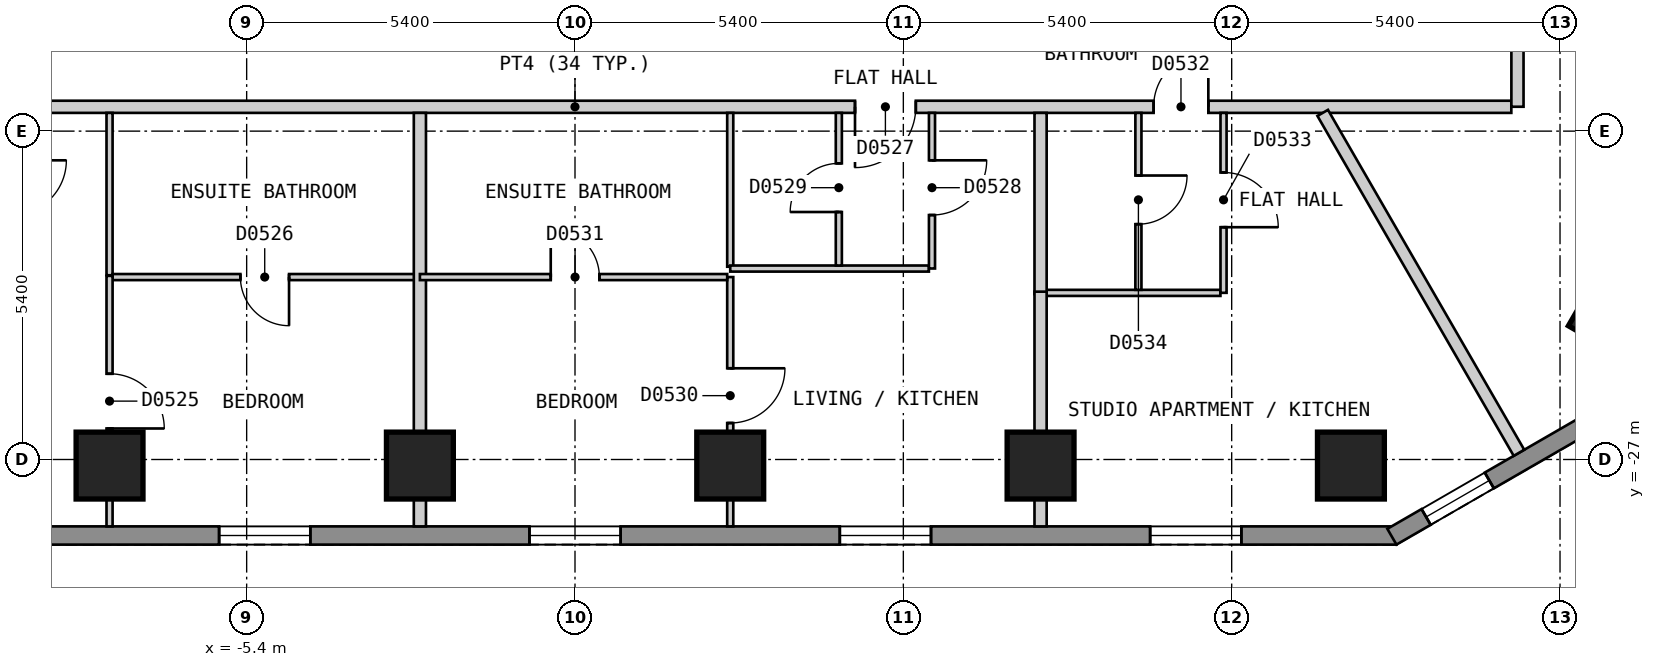
"""IFC4 building model, lengths in metres.
Left out: names, types, materials, properties, quantities, classifications, styles, units other than length and angle.
Written with IfcOpenShell. Run it as: python <this file> out.ifc"""

import sys

from ifc_helpers import new_model, si_unit, direction, frame, frame_2d, origin, origin_2d, place, context, subcontext, project, spatial, polyline, rectangle, outline, extrude, element, fill, save


model = new_model("IFC4")
c1 = context("Model", 3, precision=1e-05, world=origin(), true_north=direction((0.0, 1.0)))
c2 = subcontext(c1, "Body", "Model", "MODEL_VIEW")
j1 = project(units=[si_unit("LENGTHUNIT", "METRE"), si_unit("PLANEANGLEUNIT", "RADIAN")], contexts=[c1])
p1 = place(None, origin())
s1 = spatial("IfcSite", under=j1, at=p1, CompositionType="ELEMENT")
p2 = place(p1, origin())
s2 = spatial("IfcBuilding", under=s1, at=p2, CompositionType="ELEMENT")
p3 = place(p2, frame((0.0, 0.0, 56.4)))
s3 = spatial("IfcBuildingStorey", under=s2, at=p3, CompositionType="ELEMENT", Elevation=56.4)
for number, where, z_axis, x_axis in (
    (1, (-7.655, -27.1, 0.0), (0.0, 0.0, 1.0), (1.0, 0.0, 0.0)),
    (2, (-2.551, -27.1, 0.0), (0.0, 0.0, 1.0), (1.0, 0.0, 0.0)),
    (3, (2.553, -27.1, 0.0), (0.0, 0.0, 1.0), (1.0, 0.0, 0.0)),
    (4, (7.657, -27.1, 0.0), (0.0, 0.0, 1.0), (1.0, 0.0, 0.0)),
    (5, (12.761, -27.1, 0.0), (0.0, 0.0, 1.0), (1.0, 0.0, 0.0)),
    (6, (17.09, -24.6, 0.0), (0.0, 0.0, 1.0), (0.5, 0.866, 0.0)),
):
    element("IfcColumn", number, at=place(p3, frame(where, z_axis=z_axis, x_axis=x_axis)), inside=s3, PredefinedType="COLUMN", context=c2, shape_type="SweptSolid", body=[
        extrude(rectangle(XDim=1.1, YDim=1.1, at=origin_2d()), origin(), (0.0, 0.0, 1.0), 3.0),
    ])
p4 = place(p3, frame((-13.51, -28.25, 0.0), z_axis=(0.0, 0.0, 1.0), x_axis=(1.0, 0.0, 0.0)))
e7 = element("IfcWall", 7, at=p4, inside=s3, PredefinedType="SOLIDWALL", context=c2, shape_type="SweptSolid", body=[
    extrude(outline(polyline([(0.0, -0.15), (27.02, -0.15), (26.94, 0.15), (0.08, 0.15), (0.0, -0.15)])), origin(), (0.0, 0.0, 1.0), 2.7),
])
p5 = place(p4, frame((2.553, 0.0, 0.15)))
e8 = element("IfcOpeningElement", 8, at=p5, cuts=e7, PredefinedType="OPENING", context=c2, shape_type="SweptSolid", body=[
    extrude(rectangle(XDim=1.5, YDim=2.1, at=frame_2d((0.75, 1.05))), frame((0.0, 0.16, 0.0), z_axis=(0.0, -1.0, 0.0), x_axis=(1.0, 0.0, 0.0)), (0.0, 0.0, 1.0), 0.32),
])
p6 = place(p4, frame((7.657, 0.0, 0.15)))
e9 = element("IfcOpeningElement", 9, at=p6, cuts=e7, PredefinedType="OPENING", context=c2, shape_type="SweptSolid", body=[
    extrude(rectangle(XDim=1.5, YDim=2.1, at=frame_2d((0.75, 1.05))), frame((0.0, 0.16, 0.0), z_axis=(0.0, -1.0, 0.0), x_axis=(1.0, 0.0, 0.0)), (0.0, 0.0, 1.0), 0.32),
])
p7 = place(p4, frame((12.761, 0.0, 0.15)))
e10 = element("IfcOpeningElement", 10, at=p7, cuts=e7, PredefinedType="OPENING", context=c2, shape_type="SweptSolid", body=[
    extrude(rectangle(XDim=1.5, YDim=2.1, at=frame_2d((0.75, 1.05))), frame((0.0, 0.16, 0.0), z_axis=(0.0, -1.0, 0.0), x_axis=(1.0, 0.0, 0.0)), (0.0, 0.0, 1.0), 0.32),
])
p8 = place(p4, frame((17.865, 0.0, 0.15)))
e11 = element("IfcOpeningElement", 11, at=p8, cuts=e7, PredefinedType="OPENING", context=c2, shape_type="SweptSolid", body=[
    extrude(rectangle(XDim=1.5, YDim=2.1, at=frame_2d((0.75, 1.05))), frame((0.0, 0.16, 0.0), z_axis=(0.0, -1.0, 0.0), x_axis=(1.0, 0.0, 0.0)), (0.0, 0.0, 1.0), 0.32),
])
p9 = place(p4, frame((22.969, 0.0, 0.15)))
e12 = element("IfcOpeningElement", 12, at=p9, cuts=e7, PredefinedType="OPENING", context=c2, shape_type="SweptSolid", body=[
    extrude(rectangle(XDim=1.5, YDim=2.1, at=frame_2d((0.75, 1.05))), frame((0.0, 0.16, 0.0), z_axis=(0.0, -1.0, 0.0), x_axis=(1.0, 0.0, 0.0)), (0.0, 0.0, 1.0), 0.32),
])
p10 = place(p3, frame((13.435, -28.27, 0.0), z_axis=(0.0, 0.0, 1.0), x_axis=(0.866010750942, 0.50002537861, 0.0)))
e13 = element("IfcWall", 13, at=p10, inside=s3, PredefinedType="SOLIDWALL", context=c2, shape_type="SweptSolid", body=[
    extrude(outline(polyline([(0.0, -0.15), (5.0, -0.15), (4.919, 0.15), (0.08, 0.15), (0.0, -0.15)])), origin(), (0.0, 0.0, 1.0), 2.7),
])
p11 = place(p10, frame((0.65, 0.0, 0.15)))
e14 = element("IfcOpeningElement", 14, at=p11, cuts=e13, PredefinedType="OPENING", context=c2, shape_type="SweptSolid", body=[
    extrude(rectangle(XDim=1.2, YDim=2.1, at=frame_2d((0.6, 1.05))), frame((0.0, 0.16, 0.0), z_axis=(0.0, -1.0, 0.0), x_axis=(1.0, 0.0, 0.0)), (0.0, 0.0, 1.0), 0.32),
])
p12 = place(p3, frame((-15.4, -21.2, 0.0), z_axis=(0.0, 0.0, 1.0), x_axis=(1.0, 0.0, 0.0)))
e15 = element("IfcWall", 15, at=p12, inside=s3, PredefinedType="PARTITIONING", context=c2, shape_type="SweptSolid", body=[
    extrude(rectangle(XDim=30.799, YDim=0.2, at=frame_2d((15.399, 0.0))), origin(), (0.0, 0.0, 1.0), 2.7),
])
p13 = place(p12, frame((4.985, 0.0, 0.0)))
e16 = element("IfcOpeningElement", 16, at=p13, cuts=e15, PredefinedType="OPENING", context=c2, shape_type="SweptSolid", body=[
    extrude(rectangle(XDim=0.9, YDim=2.1, at=frame_2d((0.45, 1.05))), frame((0.0, 0.11, 0.0), z_axis=(0.0, -1.0, 0.0), x_axis=(1.0, 0.0, 0.0)), (0.0, 0.0, 1.0), 0.22),
])
p14 = place(p12, frame((20.005, 0.0, 0.0)))
e17 = element("IfcOpeningElement", 17, at=p14, cuts=e15, PredefinedType="OPENING", context=c2, shape_type="SweptSolid", body=[
    extrude(rectangle(XDim=1.0, YDim=2.1, at=frame_2d((0.5, 1.05))), frame((0.0, 0.11, 0.0), z_axis=(0.0, -1.0, 0.0), x_axis=(1.0, 0.0, 0.0)), (0.0, 0.0, 1.0), 0.22),
])
p15 = place(p12, frame((24.916, 0.0, 0.0)))
e18 = element("IfcOpeningElement", 18, at=p15, cuts=e15, PredefinedType="OPENING", context=c2, shape_type="SweptSolid", body=[
    extrude(rectangle(XDim=0.9, YDim=2.1, at=frame_2d((0.45, 1.05))), frame((0.0, 0.11, 0.0), z_axis=(0.0, -1.0, 0.0), x_axis=(1.0, 0.0, 0.0)), (0.0, 0.0, 1.0), 0.22),
])
p16 = place(p3, frame((15.5, -21.199, 0.0), z_axis=(0.0, 0.0, 1.0), x_axis=(0.0, 1.0, 0.0)))
e19 = element("IfcWall", 19, at=p16, inside=s3, PredefinedType="PARTITIONING", context=c2, shape_type="SweptSolid", body=[
    extrude(rectangle(XDim=7.575, YDim=0.2, at=frame_2d((3.788, 0.0))), origin(), (0.0, 0.0, 1.0), 2.7),
])
p17 = place(p16, frame((1.288, 0.0, 0.0)))
e20 = element("IfcOpeningElement", 20, at=p17, cuts=e19, PredefinedType="OPENING", context=c2, shape_type="SweptSolid", body=[
    extrude(rectangle(XDim=0.8, YDim=2.1, at=frame_2d((0.4, 1.05))), frame((0.0, 0.11, 0.0), z_axis=(0.0, -1.0, 0.0), x_axis=(1.0, 0.0, 0.0)), (0.0, 0.0, 1.0), 0.22),
])
p18 = place(p3, frame((-7.655, -21.3, 0.0), z_axis=(0.0, 0.0, 1.0), x_axis=(0.0, -1.0, 0.0)))
e21 = element("IfcWall", 21, at=p18, inside=s3, PredefinedType="PARTITIONING", context=c2, shape_type="SweptSolid", body=[
    extrude(rectangle(XDim=2.67, YDim=0.1, at=frame_2d((1.335, 0.0))), origin(), (0.0, 0.0, 1.0), 2.7),
])
p19 = place(p3, frame((2.553, -21.3, 0.0), z_axis=(0.0, 0.0, 1.0), x_axis=(0.0, -1.0, 0.0)))
e22 = element("IfcWall", 22, at=p19, inside=s3, PredefinedType="PARTITIONING", context=c2, shape_type="SweptSolid", body=[
    extrude(rectangle(XDim=2.53, YDim=0.1, at=frame_2d((1.265, 0.0))), origin(), (0.0, 0.0, 1.0), 2.7),
])
p20 = place(p3, frame((2.553, -23.86, 0.0), z_axis=(0.0, 0.0, 1.0), x_axis=(1.0, 0.0, 0.0)))
e23 = element("IfcWall", 23, at=p20, inside=s3, PredefinedType="PARTITIONING", context=c2, shape_type="SweptSolid", body=[
    extrude(rectangle(XDim=3.267, YDim=0.1, at=frame_2d((1.634, 0.0))), origin(), (0.0, 0.0, 1.0), 2.7),
])
p21 = place(p3, frame((-7.605, -24.0, 0.0), z_axis=(0.0, 0.0, 1.0), x_axis=(1.0, 0.0, 0.0)))
e24 = element("IfcWall", 24, at=p21, inside=s3, PredefinedType="PARTITIONING", context=c2, shape_type="SweptSolid", body=[
    extrude(rectangle(XDim=5.054, YDim=0.1, at=frame_2d((2.527, 0.0))), origin(), (0.0, 0.0, 1.0), 2.7),
])
p22 = place(p21, frame((2.102, 0.0, 0.0)))
e25 = element("IfcOpeningElement", 25, at=p22, cuts=e24, PredefinedType="OPENING", context=c2, shape_type="SweptSolid", body=[
    extrude(rectangle(XDim=0.8, YDim=2.1, at=frame_2d((0.4, 1.05))), frame((0.0, 0.06, 0.0), z_axis=(0.0, -1.0, 0.0), x_axis=(1.0, 0.0, 0.0)), (0.0, 0.0, 1.0), 0.12),
])
p23 = place(p3, frame((7.757, -24.26, 0.0), z_axis=(0.0, 0.0, 1.0), x_axis=(1.0, 0.0, 0.0)))
e26 = element("IfcWall", 26, at=p23, inside=s3, PredefinedType="PARTITIONING", context=c2, shape_type="SweptSolid", body=[
    extrude(rectangle(XDim=2.858, YDim=0.1, at=frame_2d((1.429, 0.0))), origin(), (0.0, 0.0, 1.0), 2.7),
])
p24 = place(p3, frame((4.339, -23.81, 0.0), z_axis=(0.0, 0.0, 1.0), x_axis=(0.0, 1.0, 0.0)))
e27 = element("IfcWall", 27, at=p24, inside=s3, PredefinedType="PARTITIONING", context=c2, shape_type="SweptSolid", body=[
    extrude(rectangle(XDim=2.51, YDim=0.1, at=frame_2d((1.255, 0.0))), origin(), (0.0, 0.0, 1.0), 2.7),
])
p25 = place(p24, frame((0.88, 0.0, 0.0)))
e28 = element("IfcOpeningElement", 28, at=p25, cuts=e27, PredefinedType="OPENING", context=c2, shape_type="SweptSolid", body=[
    extrude(rectangle(XDim=0.8, YDim=2.1, at=frame_2d((0.4, 1.05))), frame((0.0, 0.06, 0.0), z_axis=(0.0, -1.0, 0.0), x_axis=(1.0, 0.0, 0.0)), (0.0, 0.0, 1.0), 0.12),
])
p26 = place(p3, frame((5.871, -23.859, 0.0), z_axis=(0.0, 0.0, 1.0), x_axis=(0.0, 1.0, 0.0)))
e29 = element("IfcWall", 29, at=p26, inside=s3, PredefinedType="PARTITIONING", context=c2, shape_type="SweptSolid", body=[
    extrude(rectangle(XDim=2.559, YDim=0.1, at=frame_2d((1.279, 0.0))), origin(), (0.0, 0.0, 1.0), 2.7),
])
p27 = place(p26, frame((0.879, 0.0, 0.0)))
e30 = element("IfcOpeningElement", 30, at=p27, cuts=e29, PredefinedType="OPENING", context=c2, shape_type="SweptSolid", body=[
    extrude(rectangle(XDim=0.9, YDim=2.1, at=frame_2d((0.45, 1.05))), frame((0.0, 0.06, 0.0), z_axis=(0.0, -1.0, 0.0), x_axis=(1.0, 0.0, 0.0)), (0.0, 0.0, 1.0), 0.12),
])
p28 = place(p3, frame((9.266, -24.21, 0.0), z_axis=(0.0, 0.0, 1.0), x_axis=(0.0, 1.0, 0.0)))
e31 = element("IfcWall", 31, at=p28, inside=s3, PredefinedType="PARTITIONING", context=c2, shape_type="SweptSolid", body=[
    extrude(rectangle(XDim=2.91, YDim=0.1, at=frame_2d((1.455, 0.0))), origin(), (0.0, 0.0, 1.0), 2.7),
])
p29 = place(p28, frame((1.08, 0.0, 0.0)))
e32 = element("IfcOpeningElement", 32, at=p29, cuts=e31, PredefinedType="OPENING", context=c2, shape_type="SweptSolid", body=[
    extrude(rectangle(XDim=0.8, YDim=2.1, at=frame_2d((0.4, 1.05))), frame((0.0, 0.06, 0.0), z_axis=(0.0, -1.0, 0.0), x_axis=(1.0, 0.0, 0.0)), (0.0, 0.0, 1.0), 0.12),
])
p30 = place(p3, frame((10.666, -24.259, 0.0), z_axis=(0.0, 0.0, 1.0), x_axis=(0.0, 1.0, 0.0)))
e33 = element("IfcWall", 33, at=p30, inside=s3, PredefinedType="PARTITIONING", context=c2, shape_type="SweptSolid", body=[
    extrude(rectangle(XDim=2.959, YDim=0.1, at=frame_2d((1.479, 0.0))), origin(), (0.0, 0.0, 1.0), 2.7),
])
p31 = place(p30, frame((1.079, 0.0, 0.0)))
e34 = element("IfcOpeningElement", 34, at=p31, cuts=e33, PredefinedType="OPENING", context=c2, shape_type="SweptSolid", body=[
    extrude(rectangle(XDim=0.9, YDim=2.1, at=frame_2d((0.45, 1.05))), frame((0.0, 0.06, 0.0), z_axis=(0.0, -1.0, 0.0), x_axis=(1.0, 0.0, 0.0)), (0.0, 0.0, 1.0), 0.12),
])
p32 = place(p3, frame((2.553, -28.1, 0.0), z_axis=(0.0, 0.0, 1.0), x_axis=(0.0, 1.0, 0.0)))
e35 = element("IfcWall", 35, at=p32, inside=s3, PredefinedType="PARTITIONING", context=c2, shape_type="SweptSolid", body=[
    extrude(rectangle(XDim=4.1, YDim=0.1, at=frame_2d((2.05, 0.0))), origin(), (0.0, 0.0, 1.0), 2.7),
])
p33 = place(p32, frame((1.7, 0.0, 0.0)))
e36 = element("IfcOpeningElement", 36, at=p33, cuts=e35, PredefinedType="OPENING", context=c2, shape_type="SweptSolid", body=[
    extrude(rectangle(XDim=0.9, YDim=2.1, at=frame_2d((0.45, 1.05))), frame((0.0, 0.06, 0.0), z_axis=(0.0, -1.0, 0.0), x_axis=(1.0, 0.0, 0.0)), (0.0, 0.0, 1.0), 0.12),
])
p34 = place(p3, frame((-7.655, -28.1, 0.0), z_axis=(0.0, 0.0, 1.0), x_axis=(0.0, 1.0, 0.0)))
e37 = element("IfcWall", 37, at=p34, inside=s3, PredefinedType="PARTITIONING", context=c2, shape_type="SweptSolid", body=[
    extrude(rectangle(XDim=4.12, YDim=0.1, at=frame_2d((2.06, 0.0))), origin(), (0.0, 0.0, 1.0), 2.7),
])
p35 = place(p34, frame((1.61, 0.0, 0.0)))
e38 = element("IfcOpeningElement", 38, at=p35, cuts=e37, PredefinedType="OPENING", context=c2, shape_type="SweptSolid", body=[
    extrude(rectangle(XDim=0.9, YDim=2.1, at=frame_2d((0.45, 1.05))), frame((0.0, 0.06, 0.0), z_axis=(0.0, -1.0, 0.0), x_axis=(1.0, 0.0, 0.0)), (0.0, 0.0, 1.0), 0.12),
])
p36 = place(p3, frame((12.297, -21.3, 0.0), z_axis=(0.0, 0.0, 1.0), x_axis=(0.500056399578, -0.865992839024, 0.0)))
e39 = element("IfcWall", 39, at=p36, inside=s3, PredefinedType="PARTITIONING", context=c2, shape_type="SweptSolid", body=[
    extrude(rectangle(XDim=6.455, YDim=0.2, at=frame_2d((3.228, 0.0))), origin(), (0.0, 0.0, 1.0), 2.7),
])
p37 = place(p3, frame((7.657, -21.3, 0.0), z_axis=(0.0, 0.0, 1.0), x_axis=(0.0, -1.0, 0.0)))
e40 = element("IfcWall", 40, at=p37, inside=s3, PredefinedType="PARTITIONING", context=c2, shape_type="SweptSolid", body=[
    extrude(rectangle(XDim=2.98, YDim=0.2, at=frame_2d((1.49, 0.0))), origin(), (0.0, 0.0, 1.0), 2.7),
])
p38 = place(p3, frame((15.6, -17.846, 0.0), z_axis=(0.0, 0.0, 1.0), x_axis=(0.866071523686, -0.499920109479, 0.0)))
e41 = element("IfcWall", 41, at=p38, inside=s3, PredefinedType="PARTITIONING", context=c2, shape_type="SweptSolid", body=[
    extrude(rectangle(XDim=5.667, YDim=0.2, at=frame_2d((2.833, 0.0))), origin(), (0.0, 0.0, 1.0), 2.7),
])
p39 = place(p3, frame((7.657, -28.1, 0.0), z_axis=(0.0, 0.0, 1.0), x_axis=(0.0, 1.0, 0.0)))
e42 = element("IfcWall", 42, at=p39, inside=s3, PredefinedType="PARTITIONING", context=c2, shape_type="SweptSolid", body=[
    extrude(rectangle(XDim=3.86, YDim=0.2, at=frame_2d((1.93, 0.0))), origin(), (0.0, 0.0, 1.0), 2.7),
])
p40 = place(p3, frame((-2.551, -28.1, 0.0), z_axis=(0.0, 0.0, 1.0), x_axis=(0.0, 1.0, 0.0)))
e43 = element("IfcWall", 43, at=p40, inside=s3, PredefinedType="PARTITIONING", context=c2, shape_type="SweptSolid", body=[
    extrude(rectangle(XDim=6.8, YDim=0.2, at=frame_2d((3.4, 0.0))), origin(), (0.0, 0.0, 1.0), 2.7),
])
p41 = place(p3, frame((-2.551, -24.0, 0.0), z_axis=(0.0, 0.0, 1.0), x_axis=(1.0, 0.0, 0.0)))
e44 = element("IfcWall", 44, at=p41, inside=s3, PredefinedType="PARTITIONING", context=c2, shape_type="SweptSolid", body=[
    extrude(rectangle(XDim=5.054, YDim=0.1, at=frame_2d((2.527, 0.0))), origin(), (0.0, 0.0, 1.0), 2.7),
])
p42 = place(p41, frame((2.152, 0.0, 0.0)))
e45 = element("IfcOpeningElement", 45, at=p42, cuts=e44, PredefinedType="OPENING", context=c2, shape_type="SweptSolid", body=[
    extrude(rectangle(XDim=0.8, YDim=2.1, at=frame_2d((0.4, 1.05))), frame((0.0, 0.06, 0.0), z_axis=(0.0, -1.0, 0.0), x_axis=(1.0, 0.0, 0.0)), (0.0, 0.0, 1.0), 0.12),
])
p43 = place(p6, origin())
e46 = element("IfcWindow", 46, at=p43, inside=s3, PartitioningType="SINGLE_PANEL", PredefinedType="WINDOW", context=c2, shape_type="SweptSolid", body=[
    extrude(rectangle(XDim=1.5, YDim=2.1, at=frame_2d((0.75, 1.05))), frame((0.0, 0.03, 0.0), z_axis=(0.0, -1.0, 0.0), x_axis=(1.0, 0.0, 0.0)), (0.0, 0.0, 1.0), 0.06),
])
fill(e9, e46)
p44 = place(p7, origin())
e47 = element("IfcWindow", 47, at=p44, inside=s3, PartitioningType="SINGLE_PANEL", PredefinedType="WINDOW", context=c2, shape_type="SweptSolid", body=[
    extrude(rectangle(XDim=1.5, YDim=2.1, at=frame_2d((0.75, 1.05))), frame((0.0, 0.03, 0.0), z_axis=(0.0, -1.0, 0.0), x_axis=(1.0, 0.0, 0.0)), (0.0, 0.0, 1.0), 0.06),
])
fill(e10, e47)
p45 = place(p8, origin())
e48 = element("IfcWindow", 48, at=p45, inside=s3, PartitioningType="SINGLE_PANEL", PredefinedType="WINDOW", context=c2, shape_type="SweptSolid", body=[
    extrude(rectangle(XDim=1.5, YDim=2.1, at=frame_2d((0.75, 1.05))), frame((0.0, 0.03, 0.0), z_axis=(0.0, -1.0, 0.0), x_axis=(1.0, 0.0, 0.0)), (0.0, 0.0, 1.0), 0.06),
])
fill(e11, e48)
p46 = place(p9, origin())
e49 = element("IfcWindow", 49, at=p46, inside=s3, PartitioningType="SINGLE_PANEL", PredefinedType="WINDOW", context=c2, shape_type="SweptSolid", body=[
    extrude(rectangle(XDim=1.5, YDim=2.1, at=frame_2d((0.75, 1.05))), frame((0.0, 0.03, 0.0), z_axis=(0.0, -1.0, 0.0), x_axis=(1.0, 0.0, 0.0)), (0.0, 0.0, 1.0), 0.06),
])
fill(e12, e49)
p47 = place(p11, origin())
e50 = element("IfcWindow", 50, at=p47, inside=s3, PartitioningType="SINGLE_PANEL", PredefinedType="WINDOW", context=c2, shape_type="SweptSolid", body=[
    extrude(rectangle(XDim=1.2, YDim=2.1, at=frame_2d((0.6, 1.05))), frame((0.0, 0.03, 0.0), z_axis=(0.0, -1.0, 0.0), x_axis=(1.0, 0.0, 0.0)), (0.0, 0.0, 1.0), 0.06),
])
fill(e14, e50)
p48 = place(p35, origin())
e51 = element("IfcDoor", 51, at=p48, inside=s3, OperationType="SINGLE_SWING_LEFT", PredefinedType="DOOR", context=c2, shape_type="SweptSolid", body=[
    extrude(rectangle(XDim=0.9, YDim=2.1, at=frame_2d((0.45, 1.05))), frame((0.0, 0.025, 0.0), z_axis=(0.0, -1.0, 0.0), x_axis=(1.0, 0.0, 0.0)), (0.0, 0.0, 1.0), 0.05),
])
fill(e38, e51)
p49 = place(p22, origin())
e52 = element("IfcDoor", 52, at=p49, inside=s3, OperationType="SINGLE_SWING_RIGHT", PredefinedType="DOOR", context=c2, shape_type="SweptSolid", body=[
    extrude(rectangle(XDim=0.8, YDim=2.1, at=frame_2d((0.4, 1.05))), frame((0.0, 0.025, 0.0), z_axis=(0.0, -1.0, 0.0), x_axis=(1.0, 0.0, 0.0)), (0.0, 0.0, 1.0), 0.05),
])
fill(e25, e52)
p50 = place(p14, origin())
e53 = element("IfcDoor", 53, at=p50, inside=s3, OperationType="SINGLE_SWING_LEFT", PredefinedType="DOOR", context=c2, shape_type="SweptSolid", body=[
    extrude(rectangle(XDim=1.0, YDim=2.1, at=frame_2d((0.5, 1.05))), frame((0.0, 0.025, 0.0), z_axis=(0.0, -1.0, 0.0), x_axis=(1.0, 0.0, 0.0)), (0.0, 0.0, 1.0), 0.05),
])
fill(e17, e53)
p51 = place(p27, origin())
e54 = element("IfcDoor", 54, at=p51, inside=s3, OperationType="SINGLE_SWING_RIGHT", PredefinedType="DOOR", context=c2, shape_type="SweptSolid", body=[
    extrude(rectangle(XDim=0.9, YDim=2.1, at=frame_2d((0.45, 1.05))), frame((0.0, 0.025, 0.0), z_axis=(0.0, -1.0, 0.0), x_axis=(1.0, 0.0, 0.0)), (0.0, 0.0, 1.0), 0.05),
])
fill(e30, e54)
p52 = place(p25, origin())
e55 = element("IfcDoor", 55, at=p52, inside=s3, OperationType="SINGLE_SWING_LEFT", PredefinedType="DOOR", context=c2, shape_type="SweptSolid", body=[
    extrude(rectangle(XDim=0.8, YDim=2.1, at=frame_2d((0.4, 1.05))), frame((0.0, 0.025, 0.0), z_axis=(0.0, -1.0, 0.0), x_axis=(1.0, 0.0, 0.0)), (0.0, 0.0, 1.0), 0.05),
])
fill(e28, e55)
p53 = place(p33, origin())
e56 = element("IfcDoor", 56, at=p53, inside=s3, OperationType="SINGLE_SWING_RIGHT", PredefinedType="DOOR", context=c2, shape_type="SweptSolid", body=[
    extrude(rectangle(XDim=0.9, YDim=2.1, at=frame_2d((0.45, 1.05))), frame((0.0, 0.025, 0.0), z_axis=(0.0, -1.0, 0.0), x_axis=(1.0, 0.0, 0.0)), (0.0, 0.0, 1.0), 0.05),
])
fill(e36, e56)
p54 = place(p42, origin())
e57 = element("IfcDoor", 57, at=p54, inside=s3, OperationType="SINGLE_SWING_LEFT", PredefinedType="DOOR", context=c2, shape_type="SweptSolid", body=[
    extrude(rectangle(XDim=0.8, YDim=2.1, at=frame_2d((0.4, 1.05))), frame((0.0, 0.025, 0.0), z_axis=(0.0, -1.0, 0.0), x_axis=(1.0, 0.0, 0.0)), (0.0, 0.0, 1.0), 0.05),
])
fill(e45, e57)
p55 = place(p15, origin())
e58 = element("IfcDoor", 58, at=p55, inside=s3, OperationType="SINGLE_SWING_RIGHT", PredefinedType="DOOR", context=c2, shape_type="SweptSolid", body=[
    extrude(rectangle(XDim=0.9, YDim=2.1, at=frame_2d((0.45, 1.05))), frame((0.0, 0.025, 0.0), z_axis=(0.0, -1.0, 0.0), x_axis=(1.0, 0.0, 0.0)), (0.0, 0.0, 1.0), 0.05),
])
fill(e18, e58)
p56 = place(p31, origin())
e59 = element("IfcDoor", 59, at=p56, inside=s3, OperationType="SINGLE_SWING_LEFT", PredefinedType="DOOR", context=c2, shape_type="SweptSolid", body=[
    extrude(rectangle(XDim=0.9, YDim=2.1, at=frame_2d((0.45, 1.05))), frame((0.0, 0.025, 0.0), z_axis=(0.0, -1.0, 0.0), x_axis=(1.0, 0.0, 0.0)), (0.0, 0.0, 1.0), 0.05),
])
fill(e34, e59)
p57 = place(p29, origin())
e60 = element("IfcDoor", 60, at=p57, inside=s3, OperationType="SINGLE_SWING_RIGHT", PredefinedType="DOOR", context=c2, shape_type="SweptSolid", body=[
    extrude(rectangle(XDim=0.8, YDim=2.1, at=frame_2d((0.4, 1.05))), frame((0.0, 0.025, 0.0), z_axis=(0.0, -1.0, 0.0), x_axis=(1.0, 0.0, 0.0)), (0.0, 0.0, 1.0), 0.05),
])
fill(e32, e60)
save(model, sys.argv[1])
